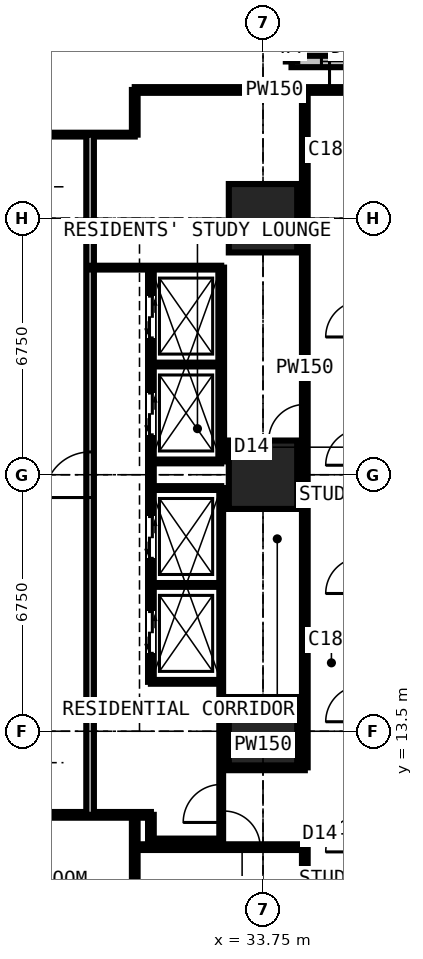
"""IFC4 building model, lengths in metres.
Left out: names, types, materials, properties, quantities, classifications, styles, units other than length and angle.
Written with IfcOpenShell. Run it as: python <this file> out.ifc"""

import sys

from ifc_helpers import new_model, si_unit, direction, frame, frame_2d, origin, origin_2d, place, context, subcontext, project, spatial, rectangle, extrude, element, fill, save


model = new_model("IFC4")
c1 = context("Model", 3, precision=1e-05, world=origin(), true_north=direction((0.0, 1.0)))
c2 = subcontext(c1, "Body", "Model", "MODEL_VIEW")
j1 = project(units=[si_unit("LENGTHUNIT", "METRE"), si_unit("PLANEANGLEUNIT", "RADIAN")], contexts=[c1])
p1 = place(None, origin())
s1 = spatial("IfcSite", under=j1, at=p1, CompositionType="ELEMENT")
p2 = place(p1, origin())
s2 = spatial("IfcBuilding", under=s1, at=p2, CompositionType="ELEMENT")
p3 = place(p2, frame((0.0, 0.0, 98.1)))
s3 = spatial("IfcBuildingStorey", under=s2, at=p3, CompositionType="ELEMENT", Elevation=98.1)
for number, where, z_axis, x_axis in (
    (1, (33.75, 13.5, 0.0), (0.0, 0.0, 1.0), (1.0, 0.0, 0.0)),
    (2, (33.75, 20.25, 0.0), (0.0, 0.0, 1.0), (1.0, 0.0, 0.0)),
    (3, (33.75, 27.0, 0.0), (0.0, 0.0, 1.0), (1.0, 0.0, 0.0)),
):
    element("IfcColumn", number, at=place(p3, frame(where, z_axis=z_axis, x_axis=x_axis)), inside=s3, PredefinedType="COLUMN", context=c2, shape_type="SweptSolid", body=[
        extrude(rectangle(XDim=1.8, YDim=1.8, at=origin_2d()), origin(), (0.0, 0.0, 1.0), 3.6),
    ])
p4 = place(p3, frame((37.875, 31.125, 0.0), z_axis=(0.0, 0.0, 1.0), x_axis=(-1.0, 0.0, 0.0)))
e4 = element("IfcWall", 4, at=p4, inside=s3, PredefinedType="SOLIDWALL", context=c2, shape_type="SweptSolid", body=[
    extrude(rectangle(XDim=3.375, YDim=0.3, at=frame_2d((1.688, 0.0))), origin(), (0.0, 0.0, 1.0), 3.375),
])
p5 = place(p4, frame((0.788, 0.0, 0.6)))
e5 = element("IfcOpeningElement", 5, at=p5, cuts=e4, PredefinedType="OPENING", context=c2, shape_type="SweptSolid", body=[
    extrude(rectangle(XDim=1.8, YDim=2.1, at=frame_2d((0.9, 1.05))), frame((0.0, 0.16, 0.0), z_axis=(0.0, -1.0, 0.0), x_axis=(1.0, 0.0, 0.0)), (0.0, 0.0, 1.0), 0.32),
])
p6 = place(p3, frame((34.5, 31.125, 0.0), z_axis=(0.0, 0.0, 1.0), x_axis=(0.0, 1.0, 0.0)))
e6 = element("IfcWall", 6, at=p6, inside=s3, PredefinedType="SOLIDWALL", context=c2, shape_type="SweptSolid", body=[
    extrude(rectangle(XDim=3.375, YDim=0.3, at=frame_2d((1.688, 0.0))), origin(), (0.0, 0.0, 1.0), 3.375),
])
p7 = place(p6, frame((0.343, 0.0, 0.9)))
e7 = element("IfcOpeningElement", 7, at=p7, cuts=e6, PredefinedType="OPENING", context=c2, shape_type="SweptSolid", body=[
    extrude(rectangle(XDim=1.2, YDim=1.8, at=frame_2d((0.6, 0.9))), frame((0.0, 0.16, 0.0), z_axis=(0.0, -1.0, 0.0), x_axis=(1.0, 0.0, 0.0)), (0.0, 0.0, 1.0), 0.32),
])
p8 = place(p3, frame((10.125, 11.3, 0.0), z_axis=(0.0, 0.0, 1.0), x_axis=(1.0, 0.0, 0.0)))
e8 = element("IfcWall", 8, at=p8, inside=s3, PredefinedType="PARTITIONING", context=c2, shape_type="SweptSolid", body=[
    extrude(rectangle(XDim=20.675, YDim=0.15, at=frame_2d((10.337, 0.0))), origin(), (0.0, 0.0, 1.0), 3.375),
])
p9 = place(p8, frame((5.2, 0.0, 0.0)))
e9 = element("IfcOpeningElement", 9, at=p9, cuts=e8, PredefinedType="OPENING", context=c2, shape_type="SweptSolid", body=[
    extrude(rectangle(XDim=1.0, YDim=2.2, at=frame_2d((0.5, 1.1))), frame((0.0, 0.085, 0.0), z_axis=(0.0, -1.0, 0.0), x_axis=(1.0, 0.0, 0.0)), (0.0, 0.0, 1.0), 0.17),
])
p10 = place(p8, frame((11.312, 0.0, 0.0)))
e10 = element("IfcOpeningElement", 10, at=p10, cuts=e8, PredefinedType="OPENING", context=c2, shape_type="SweptSolid", body=[
    extrude(rectangle(XDim=1.0, YDim=2.2, at=frame_2d((0.5, 1.1))), frame((0.0, 0.085, 0.0), z_axis=(0.0, -1.0, 0.0), x_axis=(1.0, 0.0, 0.0)), (0.0, 0.0, 1.0), 0.17),
])
p11 = place(p8, frame((3.225, 0.0, 0.0)))
e11 = element("IfcOpeningElement", 11, at=p11, cuts=e8, PredefinedType="OPENING", context=c2, shape_type="SweptSolid", body=[
    extrude(rectangle(XDim=0.95, YDim=2.2, at=frame_2d((0.475, 1.1))), frame((0.0, 0.085, 0.0), z_axis=(0.0, -1.0, 0.0), x_axis=(1.0, 0.0, 0.0)), (0.0, 0.0, 1.0), 0.17),
])
p12 = place(p3, frame((11.3, 29.2, 0.0), z_axis=(0.0, 0.0, 1.0), x_axis=(1.0, 0.0, 0.0)))
e12 = element("IfcWall", 12, at=p12, inside=s3, PredefinedType="PARTITIONING", context=c2, shape_type="SweptSolid", body=[
    extrude(rectangle(XDim=19.075, YDim=0.1, at=frame_2d((9.538, 0.0))), origin(), (0.0, 0.0, 1.0), 3.375),
])
p13 = place(p12, frame((6.4, 0.0, 0.0)))
e13 = element("IfcOpeningElement", 13, at=p13, cuts=e12, PredefinedType="OPENING", context=c2, shape_type="SweptSolid", body=[
    extrude(rectangle(XDim=0.95, YDim=2.2, at=frame_2d((0.475, 1.1))), frame((0.0, 0.06, 0.0), z_axis=(0.0, -1.0, 0.0), x_axis=(1.0, 0.0, 0.0)), (0.0, 0.0, 1.0), 0.12),
])
p14 = place(p12, frame((13.15, 0.0, 0.0)))
e14 = element("IfcOpeningElement", 14, at=p14, cuts=e12, PredefinedType="OPENING", context=c2, shape_type="SweptSolid", body=[
    extrude(rectangle(XDim=0.95, YDim=2.2, at=frame_2d((0.475, 1.1))), frame((0.0, 0.06, 0.0), z_axis=(0.0, -1.0, 0.0), x_axis=(1.0, 0.0, 0.0)), (0.0, 0.0, 1.0), 0.12),
])
p15 = place(p12, frame((0.6, 0.0, 0.0)))
e15 = element("IfcOpeningElement", 15, at=p15, cuts=e12, PredefinedType="OPENING", context=c2, shape_type="SweptSolid", body=[
    extrude(rectangle(XDim=1.0, YDim=2.2, at=frame_2d((0.5, 1.1))), frame((0.0, 0.06, 0.0), z_axis=(0.0, -1.0, 0.0), x_axis=(1.0, 0.0, 0.0)), (0.0, 0.0, 1.0), 0.12),
])
p16 = place(p3, frame((29.2, 11.3, 0.0), z_axis=(0.0, 0.0, 1.0), x_axis=(0.0, 1.0, 0.0)))
e16 = element("IfcWall", 16, at=p16, inside=s3, PredefinedType="PARTITIONING", context=c2, shape_type="SweptSolid", body=[
    extrude(rectangle(XDim=17.9, YDim=0.2, at=frame_2d((8.95, 0.0))), origin(), (0.0, 0.0, 1.0), 3.375),
])
p17 = place(p16, frame((8.35, 0.0, 0.0)))
e17 = element("IfcOpeningElement", 17, at=p17, cuts=e16, PredefinedType="OPENING", context=c2, shape_type="SweptSolid", body=[
    extrude(rectangle(XDim=1.2, YDim=2.2, at=frame_2d((0.6, 1.1))), frame((0.0, 0.11, 0.0), z_axis=(0.0, -1.0, 0.0), x_axis=(1.0, 0.0, 0.0)), (0.0, 0.0, 1.0), 0.22),
])
p18 = place(p3, frame((29.2, 25.7, 0.0), z_axis=(0.0, 0.0, 1.0), x_axis=(1.0, 0.0, 0.0)))
e18 = element("IfcWall", 18, at=p18, inside=s3, PredefinedType="SHEAR", context=c2, shape_type="SweptSolid", body=[
    extrude(rectangle(XDim=3.45, YDim=0.1, at=frame_2d((1.725, 0.0))), origin(), (0.0, 0.0, 1.0), 3.375),
])
p19 = place(p3, frame((30.375, -0.734, 0.0), z_axis=(0.0, 0.0, 1.0), x_axis=(0.0, 1.0, 0.0)))
e19 = element("IfcWall", 19, at=p19, inside=s3, PredefinedType="PARTITIONING", context=c2, shape_type="SweptSolid", body=[
    extrude(rectangle(XDim=12.034, YDim=0.15, at=frame_2d((6.017, 0.0))), origin(), (0.0, 0.0, 1.0), 3.375),
])
p20 = place(p19, frame((5.134, 0.0, 0.0)))
e20 = element("IfcOpeningElement", 20, at=p20, cuts=e19, PredefinedType="OPENING", context=c2, shape_type="SweptSolid", body=[
    extrude(rectangle(XDim=1.0, YDim=2.2, at=frame_2d((0.5, 1.1))), frame((0.0, 0.085, 0.0), z_axis=(0.0, -1.0, 0.0), x_axis=(1.0, 0.0, 0.0)), (0.0, 0.0, 1.0), 0.17),
])
p21 = place(p3, frame((30.375, 10.45, 0.0), z_axis=(0.0, 0.0, 1.0), x_axis=(1.0, 0.0, 0.0)))
e21 = element("IfcWall", 21, at=p21, inside=s3, PredefinedType="PARTITIONING", context=c2, shape_type="SweptSolid", body=[
    extrude(rectangle(XDim=4.475, YDim=0.15, at=frame_2d((2.238, 0.0))), origin(), (0.0, 0.0, 1.0), 3.375),
])
p22 = place(p21, frame((2.35, 0.0, 0.0)))
e22 = element("IfcOpeningElement", 22, at=p22, cuts=e21, PredefinedType="OPENING", context=c2, shape_type="SweptSolid", body=[
    extrude(rectangle(XDim=0.95, YDim=2.2, at=frame_2d((0.475, 1.1))), frame((0.0, 0.085, 0.0), z_axis=(0.0, -1.0, 0.0), x_axis=(1.0, 0.0, 0.0)), (0.0, 0.0, 1.0), 0.17),
])
p23 = place(p3, frame((30.375, 29.2, 0.0), z_axis=(0.0, 0.0, 1.0), x_axis=(0.0, 1.0, 0.0)))
e23 = element("IfcWall", 23, at=p23, inside=s3, PredefinedType="PARTITIONING", context=c2, shape_type="SweptSolid", body=[
    extrude(rectangle(XDim=1.175, YDim=0.15, at=frame_2d((0.587, 0.0))), origin(), (0.0, 0.0, 1.0), 3.375),
])
p24 = place(p3, frame((30.375, 30.375, 0.0), z_axis=(0.0, 0.0, 1.0), x_axis=(1.0, 0.0, 0.0)))
e24 = element("IfcWall", 24, at=p24, inside=s3, PredefinedType="PARTITIONING", context=c2, shape_type="SweptSolid", body=[
    extrude(rectangle(XDim=7.35, YDim=0.15, at=frame_2d((3.675, 0.0))), origin(), (0.0, 0.0, 1.0), 2.877),
])
p25 = place(p24, frame((5.125, 0.0, 0.0)))
e25 = element("IfcOpeningElement", 25, at=p25, cuts=e24, PredefinedType="OPENING", context=c2, shape_type="SweptSolid", body=[
    extrude(rectangle(XDim=1.0, YDim=2.2, at=frame_2d((0.5, 1.1))), frame((0.0, 0.085, 0.0), z_axis=(0.0, -1.0, 0.0), x_axis=(1.0, 0.0, 0.0)), (0.0, 0.0, 1.0), 0.17),
])
p26 = place(p3, frame((30.8, 10.6, 0.0), z_axis=(0.0, 0.0, 1.0), x_axis=(0.0, 1.0, 0.0)))
e26 = element("IfcWall", 26, at=p26, inside=s3, PredefinedType="PARTITIONING", context=c2, shape_type="SweptSolid", body=[
    extrude(rectangle(XDim=0.7, YDim=0.15, at=frame_2d((0.35, 0.0))), origin(), (0.0, 0.0, 1.0), 3.375),
])
p27 = place(p3, frame((30.8, 10.6, 0.0), z_axis=(0.0, 0.0, 1.0), x_axis=(1.0, 0.0, 0.0)))
e27 = element("IfcWall", 27, at=p27, inside=s3, PredefinedType="PARTITIONING", context=c2, shape_type="SweptSolid", body=[
    extrude(rectangle(XDim=1.85, YDim=0.15, at=frame_2d((0.925, 0.0))), origin(), (0.0, 0.0, 1.0), 3.375),
])
p28 = place(p3, frame((30.8, 14.8, 0.0), z_axis=(0.0, 0.0, 1.0), x_axis=(0.0, 1.0, 0.0)))
e28 = element("IfcWall", 28, at=p28, inside=s3, PredefinedType="PARTITIONING", context=c2, shape_type="SweptSolid", body=[
    extrude(rectangle(XDim=10.9, YDim=0.15, at=frame_2d((5.45, 0.0))), origin(), (0.0, 0.0, 1.0), 3.375),
])
p29 = place(p28, frame((0.75, 0.0, 0.0)))
e29 = element("IfcOpeningElement", 29, at=p29, cuts=e28, PredefinedType="OPENING", context=c2, shape_type="SweptSolid", body=[
    extrude(rectangle(XDim=1.1, YDim=2.2, at=frame_2d((0.55, 1.1))), frame((0.0, 0.085, 0.0), z_axis=(0.0, -1.0, 0.0), x_axis=(1.0, 0.0, 0.0)), (0.0, 0.0, 1.0), 0.17),
])
p30 = place(p28, frame((3.25, 0.0, 0.0)))
e30 = element("IfcOpeningElement", 30, at=p30, cuts=e28, PredefinedType="OPENING", context=c2, shape_type="SweptSolid", body=[
    extrude(rectangle(XDim=1.1, YDim=2.2, at=frame_2d((0.55, 1.1))), frame((0.0, 0.085, 0.0), z_axis=(0.0, -1.0, 0.0), x_axis=(1.0, 0.0, 0.0)), (0.0, 0.0, 1.0), 0.17),
])
p31 = place(p28, frame((6.5, 0.0, 0.0)))
e31 = element("IfcOpeningElement", 31, at=p31, cuts=e28, PredefinedType="OPENING", context=c2, shape_type="SweptSolid", body=[
    extrude(rectangle(XDim=1.1, YDim=2.2, at=frame_2d((0.55, 1.1))), frame((0.0, 0.085, 0.0), z_axis=(0.0, -1.0, 0.0), x_axis=(1.0, 0.0, 0.0)), (0.0, 0.0, 1.0), 0.17),
])
p32 = place(p28, frame((9.05, 0.0, 0.0)))
e32 = element("IfcOpeningElement", 32, at=p32, cuts=e28, PredefinedType="OPENING", context=c2, shape_type="SweptSolid", body=[
    extrude(rectangle(XDim=1.1, YDim=2.2, at=frame_2d((0.55, 1.1))), frame((0.0, 0.085, 0.0), z_axis=(0.0, -1.0, 0.0), x_axis=(1.0, 0.0, 0.0)), (0.0, 0.0, 1.0), 0.17),
])
for number, where, z_axis, x_axis in (
    (33, (30.8, 14.8, 0.0), (0.0, 0.0, 1.0), (1.0, 0.0, 0.0)),
    (34, (30.8, 17.35, 0.0), (0.0, 0.0, 1.0), (1.0, 0.0, 0.0)),
    (35, (30.8, 19.9, 0.0), (0.0, 0.0, 1.0), (1.0, 0.0, 0.0)),
    (36, (30.8, 20.6, 0.0), (0.0, 0.0, 1.0), (1.0, 0.0, 0.0)),
    (37, (30.8, 23.15, 0.0), (0.0, 0.0, 1.0), (1.0, 0.0, 0.0)),
):
    element("IfcWall", number, at=place(p3, frame(where, z_axis=z_axis, x_axis=x_axis)), inside=s3, PredefinedType="SHEAR", context=c2, shape_type="SweptSolid", body=[
        extrude(rectangle(XDim=1.85, YDim=0.1, at=frame_2d((0.925, 0.0))), origin(), (0.0, 0.0, 1.0), 3.375),
    ])
p33 = place(p3, frame((32.65, 10.6, 0.0), z_axis=(0.0, 0.0, 1.0), x_axis=(0.0, 1.0, 0.0)))
e38 = element("IfcWall", 38, at=p33, inside=s3, PredefinedType="SHEAR", context=c2, shape_type="SweptSolid", body=[
    extrude(rectangle(XDim=9.3, YDim=0.1, at=frame_2d((4.65, 0.0))), origin(), (0.0, 0.0, 1.0), 3.375),
])
p34 = place(p33, frame((0.5, 0.0, 0.0)))
e39 = element("IfcOpeningElement", 39, at=p34, cuts=e38, PredefinedType="OPENING", context=c2, shape_type="SweptSolid", body=[
    extrude(rectangle(XDim=1.0, YDim=2.2, at=frame_2d((0.5, 1.1))), frame((0.0, 0.06, 0.0), z_axis=(0.0, -1.0, 0.0), x_axis=(1.0, 0.0, 0.0)), (0.0, 0.0, 1.0), 0.12),
])
p35 = place(p3, frame((32.65, 12.55, 0.0), z_axis=(0.0, 0.0, 1.0), x_axis=(1.0, 0.0, 0.0)))
e40 = element("IfcWall", 40, at=p35, inside=s3, PredefinedType="PARTITIONING", context=c2, shape_type="SweptSolid", body=[
    extrude(rectangle(XDim=2.2, YDim=0.15, at=frame_2d((1.1, 0.0))), origin(), (0.0, 0.0, 1.0), 3.375),
])
p36 = place(p3, frame((32.65, 20.6, 0.0), z_axis=(0.0, 0.0, 1.0), x_axis=(0.0, 1.0, 0.0)))
e41 = element("IfcWall", 41, at=p36, inside=s3, PredefinedType="PARTITIONING", context=c2, shape_type="SweptSolid", body=[
    extrude(rectangle(XDim=5.1, YDim=0.15, at=frame_2d((2.55, 0.0))), origin(), (0.0, 0.0, 1.0), 3.375),
])
p37 = place(p3, frame((34.85, 6.75, 0.0), z_axis=(0.0, 0.0, 1.0), x_axis=(0.0, 1.0, 0.0)))
e42 = element("IfcWall", 42, at=p37, inside=s3, PredefinedType="PARTITIONING", context=c2, shape_type="SweptSolid", body=[
    extrude(rectangle(XDim=3.7, YDim=0.15, at=frame_2d((1.85, 0.0))), origin(), (0.0, 0.0, 1.0), 3.375),
])
p38 = place(p3, frame((34.85, 12.55, 0.0), z_axis=(0.0, 0.0, 1.0), x_axis=(0.0, 1.0, 0.0)))
e43 = element("IfcWall", 43, at=p38, inside=s3, PredefinedType="PARTITIONING", context=c2, shape_type="SweptSolid", body=[
    extrude(rectangle(XDim=17.825, YDim=0.15, at=frame_2d((8.913, 0.0))), origin(), (0.0, 0.0, 1.0), 3.375),
])
p39 = place(p38, frame((8.6, 0.0, 0.0)))
e44 = element("IfcOpeningElement", 44, at=p39, cuts=e43, PredefinedType="OPENING", context=c2, shape_type="SweptSolid", body=[
    extrude(rectangle(XDim=0.95, YDim=2.2, at=frame_2d((0.475, 1.1))), frame((0.0, 0.085, 0.0), z_axis=(0.0, -1.0, 0.0), x_axis=(1.0, 0.0, 0.0)), (0.0, 0.0, 1.0), 0.17),
])
p40 = place(p5, origin())
e45 = element("IfcWindow", 45, at=p40, inside=s3, PartitioningType="SINGLE_PANEL", PredefinedType="WINDOW", context=c2, shape_type="SweptSolid", body=[
    extrude(rectangle(XDim=1.8, YDim=2.1, at=frame_2d((0.9, 1.05))), frame((0.0, 0.03, 0.0), z_axis=(0.0, -1.0, 0.0), x_axis=(1.0, 0.0, 0.0)), (0.0, 0.0, 1.0), 0.06),
])
fill(e5, e45)
p41 = place(p34, origin())
e46 = element("IfcDoor", 46, at=p41, inside=s3, OperationType="SINGLE_SWING_LEFT", PredefinedType="DOOR", context=c2, shape_type="SweptSolid", body=[
    extrude(rectangle(XDim=1.0, YDim=2.2, at=frame_2d((0.5, 1.1))), frame((0.0, 0.025, 0.0), z_axis=(0.0, -1.0, 0.0), x_axis=(1.0, 0.0, 0.0)), (0.0, 0.0, 1.0), 0.05),
])
fill(e39, e46)
p42 = place(p39, origin())
e47 = element("IfcDoor", 47, at=p42, inside=s3, OperationType="SINGLE_SWING_LEFT", PredefinedType="DOOR", context=c2, shape_type="SweptSolid", body=[
    extrude(rectangle(XDim=0.95, YDim=2.2, at=frame_2d((0.475, 1.1))), frame((0.0, 0.025, 0.0), z_axis=(0.0, -1.0, 0.0), x_axis=(1.0, 0.0, 0.0)), (0.0, 0.0, 1.0), 0.05),
])
fill(e44, e47)
p43 = place(p22, origin())
e48 = element("IfcDoor", 48, at=p43, inside=s3, OperationType="SINGLE_SWING_LEFT", PredefinedType="DOOR", context=c2, shape_type="SweptSolid", body=[
    extrude(rectangle(XDim=0.95, YDim=2.2, at=frame_2d((0.475, 1.1))), frame((0.0, 0.025, 0.0), z_axis=(0.0, -1.0, 0.0), x_axis=(1.0, 0.0, 0.0)), (0.0, 0.0, 1.0), 0.05),
])
fill(e22, e48)
p44 = place(p25, origin())
e49 = element("IfcDoor", 49, at=p44, inside=s3, OperationType="SINGLE_SWING_LEFT", PredefinedType="DOOR", context=c2, shape_type="SweptSolid", body=[
    extrude(rectangle(XDim=1.0, YDim=2.2, at=frame_2d((0.5, 1.1))), frame((0.0, 0.025, 0.0), z_axis=(0.0, -1.0, 0.0), x_axis=(1.0, 0.0, 0.0)), (0.0, 0.0, 1.0), 0.05),
])
fill(e25, e49)
p45 = place(p29, origin())
e50 = element("IfcDoor", 50, at=p45, inside=s3, OperationType="DOUBLE_DOOR_SLIDING", PredefinedType="DOOR", context=c2, shape_type="SweptSolid", body=[
    extrude(rectangle(XDim=1.1, YDim=2.2, at=frame_2d((0.55, 1.1))), frame((0.0, 0.025, 0.0), z_axis=(0.0, -1.0, 0.0), x_axis=(1.0, 0.0, 0.0)), (0.0, 0.0, 1.0), 0.05),
])
fill(e29, e50)
p46 = place(p30, origin())
e51 = element("IfcDoor", 51, at=p46, inside=s3, OperationType="DOUBLE_DOOR_SLIDING", PredefinedType="DOOR", context=c2, shape_type="SweptSolid", body=[
    extrude(rectangle(XDim=1.1, YDim=2.2, at=frame_2d((0.55, 1.1))), frame((0.0, 0.025, 0.0), z_axis=(0.0, -1.0, 0.0), x_axis=(1.0, 0.0, 0.0)), (0.0, 0.0, 1.0), 0.05),
])
fill(e30, e51)
p47 = place(p31, origin())
e52 = element("IfcDoor", 52, at=p47, inside=s3, OperationType="DOUBLE_DOOR_SLIDING", PredefinedType="DOOR", context=c2, shape_type="SweptSolid", body=[
    extrude(rectangle(XDim=1.1, YDim=2.2, at=frame_2d((0.55, 1.1))), frame((0.0, 0.025, 0.0), z_axis=(0.0, -1.0, 0.0), x_axis=(1.0, 0.0, 0.0)), (0.0, 0.0, 1.0), 0.05),
])
fill(e31, e52)
p48 = place(p32, origin())
e53 = element("IfcDoor", 53, at=p48, inside=s3, OperationType="DOUBLE_DOOR_SLIDING", PredefinedType="DOOR", context=c2, shape_type="SweptSolid", body=[
    extrude(rectangle(XDim=1.1, YDim=2.2, at=frame_2d((0.55, 1.1))), frame((0.0, 0.025, 0.0), z_axis=(0.0, -1.0, 0.0), x_axis=(1.0, 0.0, 0.0)), (0.0, 0.0, 1.0), 0.05),
])
fill(e32, e53)
p49 = place(p17, origin())
e54 = element("IfcDoor", 54, at=p49, inside=s3, OperationType="DOUBLE_DOOR_SINGLE_SWING", PredefinedType="DOOR", context=c2, shape_type="SweptSolid", body=[
    extrude(rectangle(XDim=1.2, YDim=2.2, at=frame_2d((0.6, 1.1))), frame((0.0, 0.025, 0.0), z_axis=(0.0, -1.0, 0.0), x_axis=(1.0, 0.0, 0.0)), (0.0, 0.0, 1.0), 0.05),
])
fill(e17, e54)
save(model, sys.argv[1])
